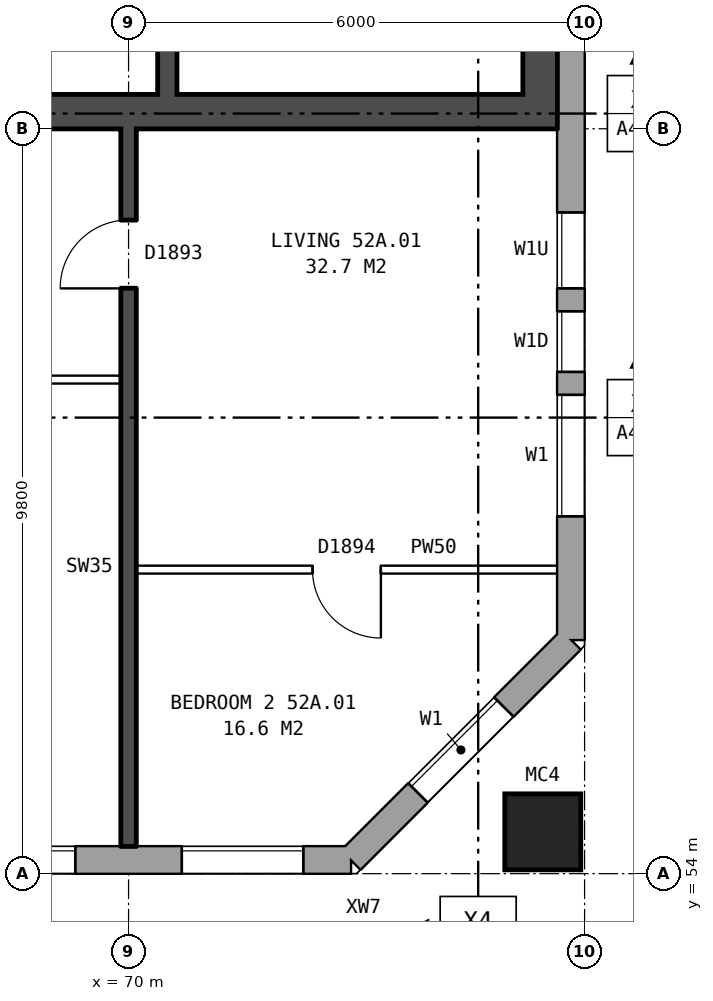
"""IFC4 building model, lengths in metres.
Left out: names, types, materials, properties, quantities, classifications, styles, units other than length and angle.
Written with IfcOpenShell. Run it as: python <this file> out.ifc"""

import sys

from ifc_helpers import new_model, si_unit, direction, frame, frame_2d, origin, origin_2d, place, context, subcontext, project, spatial, rectangle, hollow_rectangle, extrude, element, fill, save


model = new_model("IFC4")
c1 = context("Model", 3, precision=1e-05, world=origin(), true_north=direction((0.0, 1.0)))
c2 = subcontext(c1, "Body", "Model", "MODEL_VIEW")
j1 = project(units=[si_unit("LENGTHUNIT", "METRE"), si_unit("PLANEANGLEUNIT", "RADIAN")], contexts=[c1])
p1 = place(None, origin())
s1 = spatial("IfcSite", under=j1, at=p1, CompositionType="ELEMENT")
p2 = place(p1, origin())
s2 = spatial("IfcBuilding", under=s1, at=p2, CompositionType="ELEMENT")
p3 = place(p2, frame((0.0, 0.0, 185.1)))
s3 = spatial("IfcBuildingStorey", under=s2, at=p3, CompositionType="ELEMENT", Elevation=185.1)
p4 = place(p3, frame((75.45, 54.55, 0.0), z_axis=(0.0, 0.0, 1.0), x_axis=(1.0, 0.0, 0.0)))
e1 = element("IfcColumn", 1, at=p4, inside=s3, PredefinedType="COLUMN", context=c2, shape_type="SweptSolid", body=[
    extrude(hollow_rectangle(XDim=1.0, YDim=1.0, WallThickness=0.055, at=origin_2d()), origin(), (0.0, 0.0, 1.0), 3.1),
])
p5 = place(p3, frame((33.325, 54.18, 0.0), z_axis=(0.0, 0.0, 1.0), x_axis=(1.0, 0.0, 0.0)))
e2 = element("IfcWall", 2, at=p5, inside=s3, PredefinedType="STANDARD", context=c2, shape_type="SweptSolid", body=[
    extrude(rectangle(XDim=39.601, YDim=0.36, at=frame_2d((19.8, 0.0))), origin(), (0.0, 0.0, 1.0), 2.85),
])
p6 = place(p5, frame((1.375, 0.0, 0.8)))
e3 = element("IfcOpeningElement", 3, at=p6, cuts=e2, PredefinedType="OPENING", context=c2, shape_type="SweptSolid", body=[
    extrude(rectangle(XDim=1.6, YDim=1.8, at=frame_2d((0.8, 0.9))), frame((0.0, 0.19, 0.0), z_axis=(0.0, -1.0, 0.0), x_axis=(1.0, 0.0, 0.0)), (0.0, 0.0, 1.0), 0.38),
])
p7 = place(p5, frame((4.375, 0.0, 0.8)))
e4 = element("IfcOpeningElement", 4, at=p7, cuts=e2, PredefinedType="OPENING", context=c2, shape_type="SweptSolid", body=[
    extrude(rectangle(XDim=1.6, YDim=1.8, at=frame_2d((0.8, 0.9))), frame((0.0, 0.19, 0.0), z_axis=(0.0, -1.0, 0.0), x_axis=(1.0, 0.0, 0.0)), (0.0, 0.0, 1.0), 0.38),
])
p8 = place(p5, frame((7.375, 0.0, 0.8)))
e5 = element("IfcOpeningElement", 5, at=p8, cuts=e2, PredefinedType="OPENING", context=c2, shape_type="SweptSolid", body=[
    extrude(rectangle(XDim=1.6, YDim=1.8, at=frame_2d((0.8, 0.9))), frame((0.0, 0.19, 0.0), z_axis=(0.0, -1.0, 0.0), x_axis=(1.0, 0.0, 0.0)), (0.0, 0.0, 1.0), 0.38),
])
p9 = place(p5, frame((9.275, 0.0, 0.8)))
e6 = element("IfcOpeningElement", 6, at=p9, cuts=e2, PredefinedType="OPENING", context=c2, shape_type="SweptSolid", body=[
    extrude(rectangle(XDim=1.6, YDim=1.8, at=frame_2d((0.8, 0.9))), frame((0.0, 0.19, 0.0), z_axis=(0.0, -1.0, 0.0), x_axis=(1.0, 0.0, 0.0)), (0.0, 0.0, 1.0), 0.38),
])
p10 = place(p5, frame((13.075, 0.0, 0.8)))
e7 = element("IfcOpeningElement", 7, at=p10, cuts=e2, PredefinedType="OPENING", context=c2, shape_type="SweptSolid", body=[
    extrude(rectangle(XDim=0.6, YDim=0.9, at=frame_2d((0.3, 0.45))), frame((0.0, 0.19, 0.0), z_axis=(0.0, -1.0, 0.0), x_axis=(1.0, 0.0, 0.0)), (0.0, 0.0, 1.0), 0.38),
])
p11 = place(p5, frame((16.375, 0.0, 0.8)))
e8 = element("IfcOpeningElement", 8, at=p11, cuts=e2, PredefinedType="OPENING", context=c2, shape_type="SweptSolid", body=[
    extrude(rectangle(XDim=1.6, YDim=1.8, at=frame_2d((0.8, 0.9))), frame((0.0, 0.19, 0.0), z_axis=(0.0, -1.0, 0.0), x_axis=(1.0, 0.0, 0.0)), (0.0, 0.0, 1.0), 0.38),
])
p12 = place(p5, frame((19.375, 0.0, 0.8)))
e9 = element("IfcOpeningElement", 9, at=p12, cuts=e2, PredefinedType="OPENING", context=c2, shape_type="SweptSolid", body=[
    extrude(rectangle(XDim=1.6, YDim=1.8, at=frame_2d((0.8, 0.9))), frame((0.0, 0.19, 0.0), z_axis=(0.0, -1.0, 0.0), x_axis=(1.0, 0.0, 0.0)), (0.0, 0.0, 1.0), 0.38),
])
p13 = place(p5, frame((22.375, 0.0, 0.8)))
e10 = element("IfcOpeningElement", 10, at=p13, cuts=e2, PredefinedType="OPENING", context=c2, shape_type="SweptSolid", body=[
    extrude(rectangle(XDim=1.6, YDim=1.8, at=frame_2d((0.8, 0.9))), frame((0.0, 0.19, 0.0), z_axis=(0.0, -1.0, 0.0), x_axis=(1.0, 0.0, 0.0)), (0.0, 0.0, 1.0), 0.38),
])
p14 = place(p5, frame((24.875, 0.0, 0.75)))
e11 = element("IfcOpeningElement", 11, at=p14, cuts=e2, PredefinedType="OPENING", context=c2, shape_type="SweptSolid", body=[
    extrude(rectangle(XDim=0.8, YDim=1.8, at=frame_2d((0.4, 0.9))), frame((0.0, 0.19, 0.0), z_axis=(0.0, -1.0, 0.0), x_axis=(1.0, 0.0, 0.0)), (0.0, 0.0, 1.0), 0.38),
])
p15 = place(p5, frame((28.375, 0.0, 0.8)))
e12 = element("IfcOpeningElement", 12, at=p15, cuts=e2, PredefinedType="OPENING", context=c2, shape_type="SweptSolid", body=[
    extrude(rectangle(XDim=1.6, YDim=1.8, at=frame_2d((0.8, 0.9))), frame((0.0, 0.19, 0.0), z_axis=(0.0, -1.0, 0.0), x_axis=(1.0, 0.0, 0.0)), (0.0, 0.0, 1.0), 0.38),
])
p16 = place(p5, frame((31.375, 0.0, 0.8)))
e13 = element("IfcOpeningElement", 13, at=p16, cuts=e2, PredefinedType="OPENING", context=c2, shape_type="SweptSolid", body=[
    extrude(rectangle(XDim=1.6, YDim=1.8, at=frame_2d((0.8, 0.9))), frame((0.0, 0.19, 0.0), z_axis=(0.0, -1.0, 0.0), x_axis=(1.0, 0.0, 0.0)), (0.0, 0.0, 1.0), 0.38),
])
p17 = place(p5, frame((34.375, 0.0, 0.8)))
e14 = element("IfcOpeningElement", 14, at=p17, cuts=e2, PredefinedType="OPENING", context=c2, shape_type="SweptSolid", body=[
    extrude(rectangle(XDim=1.6, YDim=1.8, at=frame_2d((0.8, 0.9))), frame((0.0, 0.19, 0.0), z_axis=(0.0, -1.0, 0.0), x_axis=(1.0, 0.0, 0.0)), (0.0, 0.0, 1.0), 0.38),
])
p18 = place(p5, frame((37.375, 0.0, 0.8)))
e15 = element("IfcOpeningElement", 15, at=p18, cuts=e2, PredefinedType="OPENING", context=c2, shape_type="SweptSolid", body=[
    extrude(rectangle(XDim=1.6, YDim=1.8, at=frame_2d((0.8, 0.9))), frame((0.0, 0.19, 0.0), z_axis=(0.0, -1.0, 0.0), x_axis=(1.0, 0.0, 0.0)), (0.0, 0.0, 1.0), 0.38),
])
p19 = place(p5, frame((11.175, 0.0, 1.7)))
e16 = element("IfcOpeningElement", 16, at=p19, cuts=e2, PredefinedType="OPENING", context=c2, shape_type="SweptSolid", body=[
    extrude(rectangle(XDim=0.8, YDim=0.9, at=frame_2d((0.4, 0.45))), frame((0.0, 0.19, 0.0), z_axis=(0.0, -1.0, 0.0), x_axis=(1.0, 0.0, 0.0)), (0.0, 0.0, 1.0), 0.38),
])
p20 = place(p5, frame((13.975, 0.0, 0.8)))
e17 = element("IfcOpeningElement", 17, at=p20, cuts=e2, PredefinedType="OPENING", context=c2, shape_type="SweptSolid", body=[
    extrude(rectangle(XDim=1.4, YDim=1.8, at=frame_2d((0.7, 0.9))), frame((0.0, 0.19, 0.0), z_axis=(0.0, -1.0, 0.0), x_axis=(1.0, 0.0, 0.0)), (0.0, 0.0, 1.0), 0.38),
])
p21 = place(p5, frame((25.975, 0.0, 0.55)))
e18 = element("IfcOpeningElement", 18, at=p21, cuts=e2, PredefinedType="OPENING", context=c2, shape_type="SweptSolid", body=[
    extrude(rectangle(XDim=0.8, YDim=0.9, at=frame_2d((0.4, 0.45))), frame((0.0, 0.19, 0.0), z_axis=(0.0, -1.0, 0.0), x_axis=(1.0, 0.0, 0.0)), (0.0, 0.0, 1.0), 0.38),
])
p22 = place(p3, frame((72.925, 54.18, 0.0), z_axis=(0.0, 0.0, 1.0), x_axis=(0.707106781187, 0.707106781187, 0.0)))
e19 = element("IfcWall", 19, at=p22, inside=s3, PredefinedType="STANDARD", context=c2, shape_type="SweptSolid", body=[
    extrude(rectangle(XDim=4.094, YDim=0.36, at=frame_2d((2.047, 0.0))), origin(), (0.0, 0.0, 1.0), 2.85),
])
p23 = place(p22, frame((1.247, 0.0, 0.8)))
e20 = element("IfcOpeningElement", 20, at=p23, cuts=e19, PredefinedType="OPENING", context=c2, shape_type="SweptSolid", body=[
    extrude(rectangle(XDim=1.6, YDim=1.8, at=frame_2d((0.8, 0.9))), frame((0.0, 0.19, 0.0), z_axis=(0.0, -1.0, 0.0), x_axis=(1.0, 0.0, 0.0)), (0.0, 0.0, 1.0), 0.38),
])
p24 = place(p3, frame((75.82, 57.075, 0.0), z_axis=(0.0, 0.0, 1.0), x_axis=(0.0, 1.0, 0.0)))
e21 = element("IfcWall", 21, at=p24, inside=s3, PredefinedType="STANDARD", context=c2, shape_type="SweptSolid", body=[
    extrude(rectangle(XDim=25.851, YDim=0.36, at=frame_2d((12.925, 0.0))), origin(), (0.0, 0.0, 1.0), 2.85),
])
p25 = place(p24, frame((1.625, 0.0, 0.8)))
e22 = element("IfcOpeningElement", 22, at=p25, cuts=e21, PredefinedType="OPENING", context=c2, shape_type="SweptSolid", body=[
    extrude(rectangle(XDim=1.6, YDim=1.8, at=frame_2d((0.8, 0.9))), frame((0.0, 0.19, 0.0), z_axis=(0.0, -1.0, 0.0), x_axis=(1.0, 0.0, 0.0)), (0.0, 0.0, 1.0), 0.38),
])
p26 = place(p24, frame((3.525, 0.0, 0.8)))
e23 = element("IfcOpeningElement", 23, at=p26, cuts=e21, PredefinedType="OPENING", context=c2, shape_type="SweptSolid", body=[
    extrude(rectangle(XDim=0.8, YDim=1.8, at=frame_2d((0.4, 0.9))), frame((0.0, 0.19, 0.0), z_axis=(0.0, -1.0, 0.0), x_axis=(1.0, 0.0, 0.0)), (0.0, 0.0, 1.0), 0.38),
])
p27 = place(p24, frame((20.2, 0.0, 0.8)))
e24 = element("IfcOpeningElement", 24, at=p27, cuts=e21, PredefinedType="OPENING", context=c2, shape_type="SweptSolid", body=[
    extrude(rectangle(XDim=0.6, YDim=0.9, at=frame_2d((0.3, 0.45))), frame((0.0, 0.19, 0.0), z_axis=(0.0, -1.0, 0.0), x_axis=(1.0, 0.0, 0.0)), (0.0, 0.0, 1.0), 0.38),
])
p28 = place(p24, frame((22.625, 0.0, 0.8)))
e25 = element("IfcOpeningElement", 25, at=p28, cuts=e21, PredefinedType="OPENING", context=c2, shape_type="SweptSolid", body=[
    extrude(rectangle(XDim=1.6, YDim=1.8, at=frame_2d((0.8, 0.9))), frame((0.0, 0.19, 0.0), z_axis=(0.0, -1.0, 0.0), x_axis=(1.0, 0.0, 0.0)), (0.0, 0.0, 1.0), 0.38),
])
p29 = place(p24, frame((4.625, 0.0, 0.8)))
e26 = element("IfcOpeningElement", 26, at=p29, cuts=e21, PredefinedType="OPENING", context=c2, shape_type="SweptSolid", body=[
    extrude(rectangle(XDim=1.0, YDim=0.9, at=frame_2d((0.5, 0.45))), frame((0.0, 0.19, 0.0), z_axis=(0.0, -1.0, 0.0), x_axis=(1.0, 0.0, 0.0)), (0.0, 0.0, 1.0), 0.38),
])
p30 = place(p24, frame((21.1, 0.0, 0.8)))
e27 = element("IfcOpeningElement", 27, at=p30, cuts=e21, PredefinedType="OPENING", context=c2, shape_type="SweptSolid", body=[
    extrude(rectangle(XDim=1.2, YDim=1.5, at=frame_2d((0.6, 0.75))), frame((0.0, 0.19, 0.0), z_axis=(0.0, -1.0, 0.0), x_axis=(1.0, 0.0, 0.0)), (0.0, 0.0, 1.0), 0.38),
])
p31 = place(p3, frame((75.415, 63.8, 0.0), z_axis=(0.0, 0.0, 1.0), x_axis=(0.0, 1.0, 0.0)))
e28 = element("IfcWall", 28, at=p31, inside=s3, PredefinedType="SHEAR", context=c2, shape_type="SweptSolid", body=[
    extrude(rectangle(XDim=12.4, YDim=0.45, at=frame_2d((6.2, 0.0))), origin(), (0.0, 0.0, 1.0), 2.85),
])
p32 = place(p3, frame((67.09, 64.025, 0.0), z_axis=(0.0, 0.0, 1.0), x_axis=(1.0, 0.0, 0.0)))
e29 = element("IfcWall", 29, at=p32, inside=s3, PredefinedType="SHEAR", context=c2, shape_type="SweptSolid", body=[
    extrude(rectangle(XDim=8.1, YDim=0.45, at=frame_2d((4.05, 0.0))), origin(), (0.0, 0.0, 1.0), 2.85),
])
p33 = place(p3, frame((70.51, 64.25, 0.0), z_axis=(0.0, 0.0, 1.0), x_axis=(0.0, 1.0, 0.0)))
e30 = element("IfcWall", 30, at=p33, inside=s3, PredefinedType="SHEAR", context=c2, shape_type="SweptSolid", body=[
    extrude(rectangle(XDim=2.475, YDim=0.25, at=frame_2d((1.238, 0.0))), origin(), (0.0, 0.0, 1.0), 2.85),
])
p34 = place(p3, frame((70.1, 58.0, 0.0), z_axis=(0.0, 0.0, 1.0), x_axis=(1.0, 0.0, 0.0)))
e31 = element("IfcWall", 31, at=p34, inside=s3, PredefinedType="PARTITIONING", context=c2, shape_type="SweptSolid", body=[
    extrude(rectangle(XDim=5.54, YDim=0.1, at=frame_2d((2.77, 0.0))), origin(), (0.0, 0.0, 1.0), 2.85),
])
p35 = place(p34, frame((2.32, 0.0, 0.0)))
e32 = element("IfcOpeningElement", 32, at=p35, cuts=e31, PredefinedType="OPENING", context=c2, shape_type="SweptSolid", body=[
    extrude(rectangle(XDim=0.9, YDim=2.1, at=frame_2d((0.45, 1.05))), frame((0.0, 0.06, 0.0), z_axis=(0.0, -1.0, 0.0), x_axis=(1.0, 0.0, 0.0)), (0.0, 0.0, 1.0), 0.12),
])
p36 = place(p3, frame((64.1, 60.5, 0.0), z_axis=(0.0, 0.0, 1.0), x_axis=(1.0, 0.0, 0.0)))
e33 = element("IfcWall", 33, at=p36, inside=s3, PredefinedType="PARTITIONING", context=c2, shape_type="SweptSolid", body=[
    extrude(rectangle(XDim=5.8, YDim=0.1, at=frame_2d((2.9, 0.0))), origin(), (0.0, 0.0, 1.0), 2.85),
])
p37 = place(p36, frame((3.6, 0.0, 0.0)))
e34 = element("IfcOpeningElement", 34, at=p37, cuts=e33, PredefinedType="OPENING", context=c2, shape_type="SweptSolid", body=[
    extrude(rectangle(XDim=0.9, YDim=2.1, at=frame_2d((0.45, 1.05))), frame((0.0, 0.06, 0.0), z_axis=(0.0, -1.0, 0.0), x_axis=(1.0, 0.0, 0.0)), (0.0, 0.0, 1.0), 0.12),
])
p38 = place(p36, frame((0.7, 0.0, 0.0)))
e35 = element("IfcOpeningElement", 35, at=p38, cuts=e33, PredefinedType="OPENING", context=c2, shape_type="SweptSolid", body=[
    extrude(rectangle(XDim=0.9, YDim=2.1, at=frame_2d((0.45, 1.05))), frame((0.0, 0.06, 0.0), z_axis=(0.0, -1.0, 0.0), x_axis=(1.0, 0.0, 0.0)), (0.0, 0.0, 1.0), 0.12),
])
p39 = place(p3, frame((70.0, 54.36, 0.0), z_axis=(0.0, 0.0, 1.0), x_axis=(0.0, 1.0, 0.0)))
e36 = element("IfcWall", 36, at=p39, inside=s3, PredefinedType="SOLIDWALL", context=c2, shape_type="SweptSolid", body=[
    extrude(rectangle(XDim=9.44, YDim=0.2, at=frame_2d((4.72, 0.0))), origin(), (0.0, 0.0, 1.0), 2.85),
])
p40 = place(p39, frame((7.34, 0.0, 0.0)))
e37 = element("IfcOpeningElement", 37, at=p40, cuts=e36, PredefinedType="OPENING", context=c2, shape_type="SweptSolid", body=[
    extrude(rectangle(XDim=0.9, YDim=2.1, at=frame_2d((0.45, 1.05))), frame((0.0, 0.11, 0.0), z_axis=(0.0, -1.0, 0.0), x_axis=(1.0, 0.0, 0.0)), (0.0, 0.0, 1.0), 0.22),
])
p41 = place(p17, origin())
e38 = element("IfcWindow", 38, at=p41, inside=s3, PartitioningType="SINGLE_PANEL", PredefinedType="WINDOW", context=c2, shape_type="SweptSolid", body=[
    extrude(rectangle(XDim=1.6, YDim=1.8, at=frame_2d((0.8, 0.9))), frame((0.0, 0.15, 0.0), z_axis=(0.0, -1.0, 0.0), x_axis=(1.0, 0.0, 0.0)), (0.0, 0.0, 1.0), 0.06),
])
fill(e14, e38)
p42 = place(p18, origin())
e39 = element("IfcWindow", 39, at=p42, inside=s3, PartitioningType="SINGLE_PANEL", PredefinedType="WINDOW", context=c2, shape_type="SweptSolid", body=[
    extrude(rectangle(XDim=1.6, YDim=1.8, at=frame_2d((0.8, 0.9))), frame((0.0, 0.15, 0.0), z_axis=(0.0, -1.0, 0.0), x_axis=(1.0, 0.0, 0.0)), (0.0, 0.0, 1.0), 0.06),
])
fill(e15, e39)
p43 = place(p23, origin())
e40 = element("IfcWindow", 40, at=p43, inside=s3, PartitioningType="SINGLE_PANEL", PredefinedType="WINDOW", context=c2, shape_type="SweptSolid", body=[
    extrude(rectangle(XDim=1.6, YDim=1.8, at=frame_2d((0.8, 0.9))), frame((0.0, 0.15, 0.0), z_axis=(0.0, -1.0, 0.0), x_axis=(1.0, 0.0, 0.0)), (0.0, 0.0, 1.0), 0.06),
])
fill(e20, e40)
p44 = place(p25, origin())
e41 = element("IfcWindow", 41, at=p44, inside=s3, PartitioningType="SINGLE_PANEL", PredefinedType="WINDOW", context=c2, shape_type="SweptSolid", body=[
    extrude(rectangle(XDim=1.6, YDim=1.8, at=frame_2d((0.8, 0.9))), frame((0.0, 0.15, 0.0), z_axis=(0.0, -1.0, 0.0), x_axis=(1.0, 0.0, 0.0)), (0.0, 0.0, 1.0), 0.06),
])
fill(e22, e41)
p45 = place(p26, origin())
e42 = element("IfcWindow", 42, at=p45, inside=s3, PartitioningType="SINGLE_PANEL", PredefinedType="WINDOW", context=c2, shape_type="SweptSolid", body=[
    extrude(rectangle(XDim=0.8, YDim=1.8, at=frame_2d((0.4, 0.9))), frame((0.0, 0.15, 0.0), z_axis=(0.0, -1.0, 0.0), x_axis=(1.0, 0.0, 0.0)), (0.0, 0.0, 1.0), 0.06),
])
fill(e23, e42)
p46 = place(p35, frame((0.9, 0.0, 0.0), z_axis=(0.0, 0.0, 1.0), x_axis=(-1.0, 0.0, 0.0)))
e43 = element("IfcDoor", 43, at=p46, inside=s3, OperationType="SINGLE_SWING_LEFT", PredefinedType="DOOR", context=c2, shape_type="SweptSolid", body=[
    extrude(rectangle(XDim=0.9, YDim=2.1, at=frame_2d((0.45, 1.05))), frame((0.0, 0.025, 0.0), z_axis=(0.0, -1.0, 0.0), x_axis=(1.0, 0.0, 0.0)), (0.0, 0.0, 1.0), 0.05),
])
fill(e32, e43)
p47 = place(p40, origin())
e44 = element("IfcDoor", 44, at=p47, inside=s3, OperationType="SINGLE_SWING_LEFT", PredefinedType="DOOR", context=c2, shape_type="SweptSolid", body=[
    extrude(rectangle(XDim=0.9, YDim=2.1, at=frame_2d((0.45, 1.05))), frame((0.0, 0.025, 0.0), z_axis=(0.0, -1.0, 0.0), x_axis=(1.0, 0.0, 0.0)), (0.0, 0.0, 1.0), 0.05),
])
fill(e37, e44)
p48 = place(p29, origin())
e45 = element("IfcWindow", 45, at=p48, inside=s3, PartitioningType="SINGLE_PANEL", PredefinedType="WINDOW", context=c2, shape_type="SweptSolid", body=[
    extrude(rectangle(XDim=1.0, YDim=0.9, at=frame_2d((0.5, 0.45))), frame((0.0, 0.15, 0.0), z_axis=(0.0, -1.0, 0.0), x_axis=(1.0, 0.0, 0.0)), (0.0, 0.0, 1.0), 0.06),
])
fill(e26, e45)
save(model, sys.argv[1])
